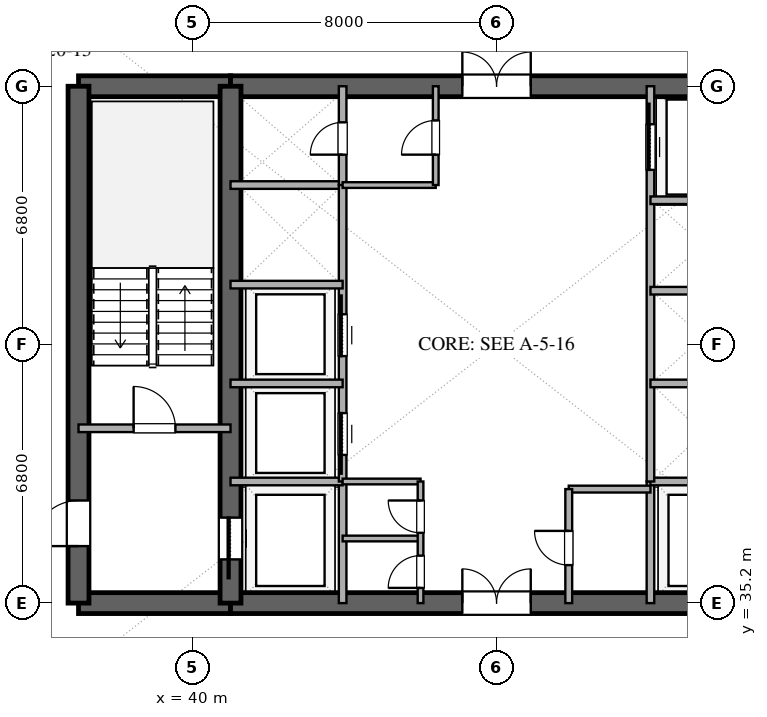
"""IFC4 building model, lengths in metres.
Left out: names, types, materials, properties, quantities, classifications, styles, units other than length and angle.
Written with IfcOpenShell. Run it as: python <this file> out.ifc"""

import sys

from ifc_helpers import new_model, si_unit, direction, frame, frame_2d, origin, place, context, subcontext, project, spatial, rectangle, extrude, element, fill, save


model = new_model("IFC4")
c1 = context("Model", 3, precision=1e-05, world=origin(), true_north=direction((0.0, 1.0)))
c2 = subcontext(c1, "Body", "Model", "MODEL_VIEW")
j1 = project(units=[si_unit("LENGTHUNIT", "METRE"), si_unit("PLANEANGLEUNIT", "RADIAN")], contexts=[c1])
p1 = place(None, origin())
s1 = spatial("IfcSite", under=j1, at=p1, CompositionType="ELEMENT")
p2 = place(p1, origin())
s2 = spatial("IfcBuilding", under=s1, at=p2, CompositionType="ELEMENT")
p3 = place(p2, frame((0.0, 0.0, 84.0)))
s3 = spatial("IfcBuildingStorey", under=s2, at=p3, CompositionType="ELEMENT", Elevation=84.0)
p4 = place(p3, frame((37.0, 35.2, 0.0), z_axis=(0.0, 0.0, 1.0), x_axis=(1.0, 0.0, 0.0)))
e1 = element("IfcWall", 1, at=p4, inside=s3, PredefinedType="SHEAR", context=c2, shape_type="SweptSolid", body=[
    extrude(rectangle(XDim=4.0, YDim=0.55, at=frame_2d((2.0, 0.0))), origin(), (0.0, 0.0, 1.0), 3.38),
])
p5 = place(p3, frame((41.0, 35.2, 0.0), z_axis=(0.0, 0.0, 1.0), x_axis=(1.0, 0.0, 0.0)))
e2 = element("IfcWall", 2, at=p5, inside=s3, PredefinedType="SHEAR", context=c2, shape_type="SweptSolid", body=[
    extrude(rectangle(XDim=14.0, YDim=0.55, at=frame_2d((7.0, 0.0))), origin(), (0.0, 0.0, 1.0), 3.38),
])
p6 = place(p5, frame((6.1, 0.0, 0.0)))
e3 = element("IfcOpeningElement", 3, at=p6, cuts=e2, PredefinedType="OPENING", context=c2, shape_type="SweptSolid", body=[
    extrude(rectangle(XDim=1.8, YDim=2.25, at=frame_2d((0.9, 1.125))), frame((0.0, 0.285, 0.0), z_axis=(0.0, -1.0, 0.0), x_axis=(1.0, 0.0, 0.0)), (0.0, 0.0, 1.0), 0.57),
])
p7 = place(p3, frame((37.0, 48.8, 0.0), z_axis=(0.0, 0.0, 1.0), x_axis=(1.0, 0.0, 0.0)))
e4 = element("IfcWall", 4, at=p7, inside=s3, PredefinedType="SHEAR", context=c2, shape_type="SweptSolid", body=[
    extrude(rectangle(XDim=4.0, YDim=0.55, at=frame_2d((2.0, 0.0))), origin(), (0.0, 0.0, 1.0), 3.38),
])
p8 = place(p3, frame((41.0, 48.8, 0.0), z_axis=(0.0, 0.0, 1.0), x_axis=(1.0, 0.0, 0.0)))
e5 = element("IfcWall", 5, at=p8, inside=s3, PredefinedType="SHEAR", context=c2, shape_type="SweptSolid", body=[
    extrude(rectangle(XDim=14.0, YDim=0.55, at=frame_2d((7.0, 0.0))), origin(), (0.0, 0.0, 1.0), 3.38),
])
p9 = place(p8, frame((6.1, 0.0, 0.0)))
e6 = element("IfcOpeningElement", 6, at=p9, cuts=e5, PredefinedType="OPENING", context=c2, shape_type="SweptSolid", body=[
    extrude(rectangle(XDim=1.8, YDim=2.25, at=frame_2d((0.9, 1.125))), frame((0.0, 0.285, 0.0), z_axis=(0.0, -1.0, 0.0), x_axis=(1.0, 0.0, 0.0)), (0.0, 0.0, 1.0), 0.57),
])
p10 = place(p3, frame((37.0, 35.2, 0.0), z_axis=(0.0, 0.0, 1.0), x_axis=(0.0, 1.0, 0.0)))
e7 = element("IfcWall", 7, at=p10, inside=s3, PredefinedType="SHEAR", context=c2, shape_type="SweptSolid", body=[
    extrude(rectangle(XDim=13.6, YDim=0.55, at=frame_2d((6.8, 0.0))), origin(), (0.0, 0.0, 1.0), 3.38),
])
p11 = place(p10, frame((1.5, 0.0, 0.0)))
e8 = element("IfcOpeningElement", 8, at=p11, cuts=e7, PredefinedType="OPENING", context=c2, shape_type="SweptSolid", body=[
    extrude(rectangle(XDim=1.2, YDim=2.15, at=frame_2d((0.6, 1.075))), frame((0.0, 0.285, 0.0), z_axis=(0.0, -1.0, 0.0), x_axis=(1.0, 0.0, 0.0)), (0.0, 0.0, 1.0), 0.57),
])
p12 = place(p3, frame((41.0, 35.2, 0.0), z_axis=(0.0, 0.0, 1.0), x_axis=(0.0, 1.0, 0.0)))
e9 = element("IfcWall", 9, at=p12, inside=s3, PredefinedType="SHEAR", context=c2, shape_type="SweptSolid", body=[
    extrude(rectangle(XDim=13.6, YDim=0.55, at=frame_2d((6.8, 0.0))), origin(), (0.0, 0.0, 1.0), 3.38),
])
p13 = place(p12, frame((1.15, 0.0, 0.0)))
e10 = element("IfcOpeningElement", 10, at=p13, cuts=e9, PredefinedType="OPENING", context=c2, shape_type="SweptSolid", body=[
    extrude(rectangle(XDim=1.1, YDim=2.2, at=frame_2d((0.55, 1.1))), frame((0.0, 0.285, 0.0), z_axis=(0.0, -1.0, 0.0), x_axis=(1.0, 0.0, 0.0)), (0.0, 0.0, 1.0), 0.57),
])
p14 = place(p3, frame((37.0, 39.8, 0.0), z_axis=(0.0, 0.0, 1.0), x_axis=(1.0, 0.0, 0.0)))
e11 = element("IfcWall", 11, at=p14, inside=s3, PredefinedType="SOLIDWALL", context=c2, shape_type="SweptSolid", body=[
    extrude(rectangle(XDim=4.0, YDim=0.2, at=frame_2d((2.0, 0.0))), origin(), (0.0, 0.0, 1.0), 2.74),
])
p15 = place(p14, frame((1.45, 0.0, 0.0)))
e12 = element("IfcOpeningElement", 12, at=p15, cuts=e11, PredefinedType="OPENING", context=c2, shape_type="SweptSolid", body=[
    extrude(rectangle(XDim=1.1, YDim=2.15, at=frame_2d((0.55, 1.075))), frame((0.0, 0.11, 0.0), z_axis=(0.0, -1.0, 0.0), x_axis=(1.0, 0.0, 0.0)), (0.0, 0.0, 1.0), 0.22),
])
p16 = place(p3, frame((43.95, 35.2, 0.0), z_axis=(0.0, 0.0, 1.0), x_axis=(0.0, 1.0, 0.0)))
e13 = element("IfcWall", 13, at=p16, inside=s3, PredefinedType="SOLIDWALL", context=c2, shape_type="SweptSolid", body=[
    extrude(rectangle(XDim=3.2, YDim=0.2, at=frame_2d((1.6, 0.0))), origin(), (0.0, 0.0, 1.0), 2.74),
])
p17 = place(p3, frame((41.0, 38.4, 0.0), z_axis=(0.0, 0.0, 1.0), x_axis=(1.0, 0.0, 0.0)))
e14 = element("IfcWall", 14, at=p17, inside=s3, PredefinedType="SOLIDWALL", context=c2, shape_type="SweptSolid", body=[
    extrude(rectangle(XDim=2.95, YDim=0.2, at=frame_2d((1.475, 0.0))), origin(), (0.0, 0.0, 1.0), 2.74),
])
p18 = place(p3, frame((52.05, 35.2, 0.0), z_axis=(0.0, 0.0, 1.0), x_axis=(0.0, 1.0, 0.0)))
e15 = element("IfcWall", 15, at=p18, inside=s3, PredefinedType="SOLIDWALL", context=c2, shape_type="SweptSolid", body=[
    extrude(rectangle(XDim=3.2, YDim=0.2, at=frame_2d((1.6, 0.0))), origin(), (0.0, 0.0, 1.0), 2.74),
])
for number, where, z_axis, x_axis in (
    (16, (52.05, 38.4, 0.0), (0.0, 0.0, 1.0), (1.0, 0.0, 0.0)),
    (17, (41.0, 46.2, 0.0), (0.0, 0.0, 1.0), (1.0, 0.0, 0.0)),
):
    element("IfcWall", number, at=place(p3, frame(where, z_axis=z_axis, x_axis=x_axis)), inside=s3, PredefinedType="SOLIDWALL", context=c2, shape_type="SweptSolid", body=[
        extrude(rectangle(XDim=2.95, YDim=0.2, at=frame_2d((1.475, 0.0))), origin(), (0.0, 0.0, 1.0), 2.74),
    ])
p19 = place(p3, frame((43.95, 46.2, 0.0), z_axis=(0.0, 0.0, 1.0), x_axis=(0.0, 1.0, 0.0)))
e18 = element("IfcWall", 18, at=p19, inside=s3, PredefinedType="SOLIDWALL", context=c2, shape_type="SweptSolid", body=[
    extrude(rectangle(XDim=2.6, YDim=0.2, at=frame_2d((1.3, 0.0))), origin(), (0.0, 0.0, 1.0), 2.74),
])
p20 = place(p19, frame((0.8, 0.0, 0.0)))
e19 = element("IfcOpeningElement", 19, at=p20, cuts=e18, PredefinedType="OPENING", context=c2, shape_type="SweptSolid", body=[
    extrude(rectangle(XDim=0.85, YDim=2.15, at=frame_2d((0.425, 1.075))), frame((0.0, 0.11, 0.0), z_axis=(0.0, -1.0, 0.0), x_axis=(1.0, 0.0, 0.0)), (0.0, 0.0, 1.0), 0.22),
])
p21 = place(p3, frame((43.95, 38.4, 0.0), z_axis=(0.0, 0.0, 1.0), x_axis=(0.0, 1.0, 0.0)))
e20 = element("IfcWall", 20, at=p21, inside=s3, PredefinedType="SOLIDWALL", context=c2, shape_type="SweptSolid", body=[
    extrude(rectangle(XDim=7.8, YDim=0.2, at=frame_2d((3.9, 0.0))), origin(), (0.0, 0.0, 1.0), 2.74),
])
p22 = place(p21, frame((0.7, 0.0, 0.0)))
e21 = element("IfcOpeningElement", 21, at=p22, cuts=e20, PredefinedType="OPENING", context=c2, shape_type="SweptSolid", body=[
    extrude(rectangle(XDim=1.1, YDim=2.2, at=frame_2d((0.55, 1.1))), frame((0.0, 0.11, 0.0), z_axis=(0.0, -1.0, 0.0), x_axis=(1.0, 0.0, 0.0)), (0.0, 0.0, 1.0), 0.22),
])
p23 = place(p21, frame((3.3, 0.0, 0.0)))
e22 = element("IfcOpeningElement", 22, at=p23, cuts=e20, PredefinedType="OPENING", context=c2, shape_type="SweptSolid", body=[
    extrude(rectangle(XDim=1.1, YDim=2.2, at=frame_2d((0.55, 1.1))), frame((0.0, 0.11, 0.0), z_axis=(0.0, -1.0, 0.0), x_axis=(1.0, 0.0, 0.0)), (0.0, 0.0, 1.0), 0.22),
])
for number, where, z_axis, x_axis in (
    (23, (41.0, 40.98, 0.0), (0.0, 0.0, 1.0), (1.0, 0.0, 0.0)),
    (24, (41.0, 43.58, 0.0), (0.0, 0.0, 1.0), (1.0, 0.0, 0.0)),
):
    element("IfcWall", number, at=place(p3, frame(where, z_axis=z_axis, x_axis=x_axis)), inside=s3, PredefinedType="SOLIDWALL", context=c2, shape_type="SweptSolid", body=[
        extrude(rectangle(XDim=2.95, YDim=0.2, at=frame_2d((1.475, 0.0))), origin(), (0.0, 0.0, 1.0), 2.74),
    ])
p24 = place(p3, frame((52.05, 38.4, 0.0), z_axis=(0.0, 0.0, 1.0), x_axis=(0.0, 1.0, 0.0)))
e25 = element("IfcWall", 25, at=p24, inside=s3, PredefinedType="SOLIDWALL", context=c2, shape_type="SweptSolid", body=[
    extrude(rectangle(XDim=10.4, YDim=0.2, at=frame_2d((5.2, 0.0))), origin(), (0.0, 0.0, 1.0), 2.74),
])
p25 = place(p24, frame((8.2, 0.0, 0.0)))
e26 = element("IfcOpeningElement", 26, at=p25, cuts=e25, PredefinedType="OPENING", context=c2, shape_type="SweptSolid", body=[
    extrude(rectangle(XDim=1.2, YDim=2.2, at=frame_2d((0.6, 1.1))), frame((0.0, 0.11, 0.0), z_axis=(0.0, -1.0, 0.0), x_axis=(1.0, 0.0, 0.0)), (0.0, 0.0, 1.0), 0.22),
])
for number, where, z_axis, x_axis in (
    (27, (52.05, 40.98, 0.0), (0.0, 0.0, 1.0), (1.0, 0.0, 0.0)),
    (28, (52.05, 43.42, 0.0), (0.0, 0.0, 1.0), (1.0, 0.0, 0.0)),
    (29, (52.05, 45.8, 0.0), (0.0, 0.0, 1.0), (1.0, 0.0, 0.0)),
):
    element("IfcWall", number, at=place(p3, frame(where, z_axis=z_axis, x_axis=x_axis)), inside=s3, PredefinedType="SOLIDWALL", context=c2, shape_type="SweptSolid", body=[
        extrude(rectangle(XDim=2.95, YDim=0.2, at=frame_2d((1.475, 0.0))), origin(), (0.0, 0.0, 1.0), 2.74),
    ])
for number, where, z_axis, x_axis in (
    (30, (43.95, 36.9, 0.0), (0.0, 0.0, 1.0), (1.0, 0.0, 0.0)),
    (31, (43.95, 38.4, 0.0), (0.0, 0.0, 1.0), (1.0, 0.0, 0.0)),
):
    element("IfcWall", number, at=place(p3, frame(where, z_axis=z_axis, x_axis=x_axis)), inside=s3, PredefinedType="PARTITIONING", context=c2, shape_type="SweptSolid", body=[
        extrude(rectangle(XDim=2.05, YDim=0.15, at=frame_2d((1.025, 0.0))), origin(), (0.0, 0.0, 1.0), 2.74),
    ])
p26 = place(p3, frame((46.0, 35.2, 0.0), z_axis=(0.0, 0.0, 1.0), x_axis=(0.0, 1.0, 0.0)))
e32 = element("IfcWall", 32, at=p26, inside=s3, PredefinedType="PARTITIONING", context=c2, shape_type="SweptSolid", body=[
    extrude(rectangle(XDim=3.2, YDim=0.15, at=frame_2d((1.6, 0.0))), origin(), (0.0, 0.0, 1.0), 2.74),
])
p27 = place(p26, frame((0.4, 0.0, 0.0)))
e33 = element("IfcOpeningElement", 33, at=p27, cuts=e32, PredefinedType="OPENING", context=c2, shape_type="SweptSolid", body=[
    extrude(rectangle(XDim=0.85, YDim=2.15, at=frame_2d((0.425, 1.075))), frame((0.0, 0.085, 0.0), z_axis=(0.0, -1.0, 0.0), x_axis=(1.0, 0.0, 0.0)), (0.0, 0.0, 1.0), 0.17),
])
p28 = place(p26, frame((1.85, 0.0, 0.0)))
e34 = element("IfcOpeningElement", 34, at=p28, cuts=e32, PredefinedType="OPENING", context=c2, shape_type="SweptSolid", body=[
    extrude(rectangle(XDim=0.85, YDim=2.15, at=frame_2d((0.425, 1.075))), frame((0.0, 0.085, 0.0), z_axis=(0.0, -1.0, 0.0), x_axis=(1.0, 0.0, 0.0)), (0.0, 0.0, 1.0), 0.17),
])
p29 = place(p3, frame((43.95, 46.2, 0.0), z_axis=(0.0, 0.0, 1.0), x_axis=(1.0, 0.0, 0.0)))
e35 = element("IfcWall", 35, at=p29, inside=s3, PredefinedType="PARTITIONING", context=c2, shape_type="SweptSolid", body=[
    extrude(rectangle(XDim=2.45, YDim=0.15, at=frame_2d((1.225, 0.0))), origin(), (0.0, 0.0, 1.0), 2.74),
])
p30 = place(p3, frame((46.4, 46.2, 0.0), z_axis=(0.0, 0.0, 1.0), x_axis=(0.0, 1.0, 0.0)))
e36 = element("IfcWall", 36, at=p30, inside=s3, PredefinedType="PARTITIONING", context=c2, shape_type="SweptSolid", body=[
    extrude(rectangle(XDim=2.6, YDim=0.15, at=frame_2d((1.3, 0.0))), origin(), (0.0, 0.0, 1.0), 2.74),
])
p31 = place(p30, frame((0.8, 0.0, 0.0)))
e37 = element("IfcOpeningElement", 37, at=p31, cuts=e36, PredefinedType="OPENING", context=c2, shape_type="SweptSolid", body=[
    extrude(rectangle(XDim=0.9, YDim=2.15, at=frame_2d((0.45, 1.075))), frame((0.0, 0.085, 0.0), z_axis=(0.0, -1.0, 0.0), x_axis=(1.0, 0.0, 0.0)), (0.0, 0.0, 1.0), 0.17),
])
p32 = place(p3, frame((49.9, 38.2, 0.0), z_axis=(0.0, 0.0, 1.0), x_axis=(1.0, 0.0, 0.0)))
e38 = element("IfcWall", 38, at=p32, inside=s3, PredefinedType="PLUMBINGWALL", context=c2, shape_type="SweptSolid", body=[
    extrude(rectangle(XDim=2.15, YDim=0.18, at=frame_2d((1.075, 0.0))), origin(), (0.0, 0.0, 1.0), 2.74),
])
p33 = place(p3, frame((49.9, 35.2, 0.0), z_axis=(0.0, 0.0, 1.0), x_axis=(0.0, 1.0, 0.0)))
e39 = element("IfcWall", 39, at=p33, inside=s3, PredefinedType="PLUMBINGWALL", context=c2, shape_type="SweptSolid", body=[
    extrude(rectangle(XDim=3.0, YDim=0.18, at=frame_2d((1.5, 0.0))), origin(), (0.0, 0.0, 1.0), 2.74),
])
p34 = place(p33, frame((1.0, 0.0, 0.0)))
e40 = element("IfcOpeningElement", 40, at=p34, cuts=e39, PredefinedType="OPENING", context=c2, shape_type="SweptSolid", body=[
    extrude(rectangle(XDim=0.9, YDim=2.1, at=frame_2d((0.45, 1.05))), frame((0.0, 0.1, 0.0), z_axis=(0.0, -1.0, 0.0), x_axis=(1.0, 0.0, 0.0)), (0.0, 0.0, 1.0), 0.2),
])
p35 = place(p13, origin())
e41 = element("IfcDoor", 41, at=p35, inside=s3, OperationType="SLIDING_TO_LEFT", PredefinedType="DOOR", context=c2, shape_type="SweptSolid", body=[
    extrude(rectangle(XDim=1.1, YDim=2.2, at=frame_2d((0.55, 1.1))), frame((0.0, 0.025, 0.0), z_axis=(0.0, -1.0, 0.0), x_axis=(1.0, 0.0, 0.0)), (0.0, 0.0, 1.0), 0.05),
])
fill(e10, e41)
p36 = place(p11, origin())
e42 = element("IfcDoor", 42, at=p36, inside=s3, OperationType="SINGLE_SWING_LEFT", PredefinedType="DOOR", context=c2, shape_type="SweptSolid", body=[
    extrude(rectangle(XDim=1.2, YDim=2.15, at=frame_2d((0.6, 1.075))), frame((0.0, 0.025, 0.0), z_axis=(0.0, -1.0, 0.0), x_axis=(1.0, 0.0, 0.0)), (0.0, 0.0, 1.0), 0.05),
])
fill(e8, e42)
p37 = place(p6, origin())
e43 = element("IfcDoor", 43, at=p37, inside=s3, OperationType="DOUBLE_DOOR_SINGLE_SWING", PredefinedType="DOOR", context=c2, shape_type="SweptSolid", body=[
    extrude(rectangle(XDim=1.8, YDim=2.25, at=frame_2d((0.9, 1.125))), frame((0.0, 0.025, 0.0), z_axis=(0.0, -1.0, 0.0), x_axis=(1.0, 0.0, 0.0)), (0.0, 0.0, 1.0), 0.05),
])
fill(e3, e43)
p38 = place(p9, origin())
e44 = element("IfcDoor", 44, at=p38, inside=s3, OperationType="DOUBLE_DOOR_SINGLE_SWING", PredefinedType="DOOR", context=c2, shape_type="SweptSolid", body=[
    extrude(rectangle(XDim=1.8, YDim=2.25, at=frame_2d((0.9, 1.125))), frame((0.0, 0.025, 0.0), z_axis=(0.0, -1.0, 0.0), x_axis=(1.0, 0.0, 0.0)), (0.0, 0.0, 1.0), 0.05),
])
fill(e6, e44)
p39 = place(p15, origin())
e45 = element("IfcDoor", 45, at=p39, inside=s3, OperationType="SINGLE_SWING_LEFT", PredefinedType="DOOR", context=c2, shape_type="SweptSolid", body=[
    extrude(rectangle(XDim=1.1, YDim=2.15, at=frame_2d((0.55, 1.075))), frame((0.0, 0.025, 0.0), z_axis=(0.0, -1.0, 0.0), x_axis=(1.0, 0.0, 0.0)), (0.0, 0.0, 1.0), 0.05),
])
fill(e12, e45)
p40 = place(p20, origin())
e46 = element("IfcDoor", 46, at=p40, inside=s3, OperationType="SINGLE_SWING_LEFT", PredefinedType="DOOR", context=c2, shape_type="SweptSolid", body=[
    extrude(rectangle(XDim=0.85, YDim=2.15, at=frame_2d((0.425, 1.075))), frame((0.0, 0.025, 0.0), z_axis=(0.0, -1.0, 0.0), x_axis=(1.0, 0.0, 0.0)), (0.0, 0.0, 1.0), 0.05),
])
fill(e19, e46)
p41 = place(p22, origin())
e47 = element("IfcDoor", 47, at=p41, inside=s3, OperationType="SLIDING_TO_LEFT", PredefinedType="DOOR", context=c2, shape_type="SweptSolid", body=[
    extrude(rectangle(XDim=1.1, YDim=2.2, at=frame_2d((0.55, 1.1))), frame((0.0, 0.025, 0.0), z_axis=(0.0, -1.0, 0.0), x_axis=(1.0, 0.0, 0.0)), (0.0, 0.0, 1.0), 0.05),
])
fill(e21, e47)
p42 = place(p23, origin())
e48 = element("IfcDoor", 48, at=p42, inside=s3, OperationType="SLIDING_TO_RIGHT", PredefinedType="DOOR", context=c2, shape_type="SweptSolid", body=[
    extrude(rectangle(XDim=1.1, YDim=2.2, at=frame_2d((0.55, 1.1))), frame((0.0, 0.025, 0.0), z_axis=(0.0, -1.0, 0.0), x_axis=(1.0, 0.0, 0.0)), (0.0, 0.0, 1.0), 0.05),
])
fill(e22, e48)
p43 = place(p25, origin())
e49 = element("IfcDoor", 49, at=p43, inside=s3, OperationType="SLIDING_TO_RIGHT", PredefinedType="DOOR", context=c2, shape_type="SweptSolid", body=[
    extrude(rectangle(XDim=1.2, YDim=2.2, at=frame_2d((0.6, 1.1))), frame((0.0, 0.025, 0.0), z_axis=(0.0, -1.0, 0.0), x_axis=(1.0, 0.0, 0.0)), (0.0, 0.0, 1.0), 0.05),
])
fill(e26, e49)
p44 = place(p27, origin())
e50 = element("IfcDoor", 50, at=p44, inside=s3, OperationType="SINGLE_SWING_LEFT", PredefinedType="DOOR", context=c2, shape_type="SweptSolid", body=[
    extrude(rectangle(XDim=0.85, YDim=2.15, at=frame_2d((0.425, 1.075))), frame((0.0, 0.025, 0.0), z_axis=(0.0, -1.0, 0.0), x_axis=(1.0, 0.0, 0.0)), (0.0, 0.0, 1.0), 0.05),
])
fill(e33, e50)
p45 = place(p28, origin())
e51 = element("IfcDoor", 51, at=p45, inside=s3, OperationType="SINGLE_SWING_RIGHT", PredefinedType="DOOR", context=c2, shape_type="SweptSolid", body=[
    extrude(rectangle(XDim=0.85, YDim=2.15, at=frame_2d((0.425, 1.075))), frame((0.0, 0.025, 0.0), z_axis=(0.0, -1.0, 0.0), x_axis=(1.0, 0.0, 0.0)), (0.0, 0.0, 1.0), 0.05),
])
fill(e34, e51)
p46 = place(p31, origin())
e52 = element("IfcDoor", 52, at=p46, inside=s3, OperationType="SINGLE_SWING_LEFT", PredefinedType="DOOR", context=c2, shape_type="SweptSolid", body=[
    extrude(rectangle(XDim=0.9, YDim=2.15, at=frame_2d((0.45, 1.075))), frame((0.0, 0.025, 0.0), z_axis=(0.0, -1.0, 0.0), x_axis=(1.0, 0.0, 0.0)), (0.0, 0.0, 1.0), 0.05),
])
fill(e37, e52)
p47 = place(p34, origin())
e53 = element("IfcDoor", 53, at=p47, inside=s3, OperationType="SINGLE_SWING_RIGHT", PredefinedType="DOOR", context=c2, shape_type="SweptSolid", body=[
    extrude(rectangle(XDim=0.9, YDim=2.1, at=frame_2d((0.45, 1.05))), frame((0.0, 0.025, 0.0), z_axis=(0.0, -1.0, 0.0), x_axis=(1.0, 0.0, 0.0)), (0.0, 0.0, 1.0), 0.05),
])
fill(e40, e53)
save(model, sys.argv[1])
